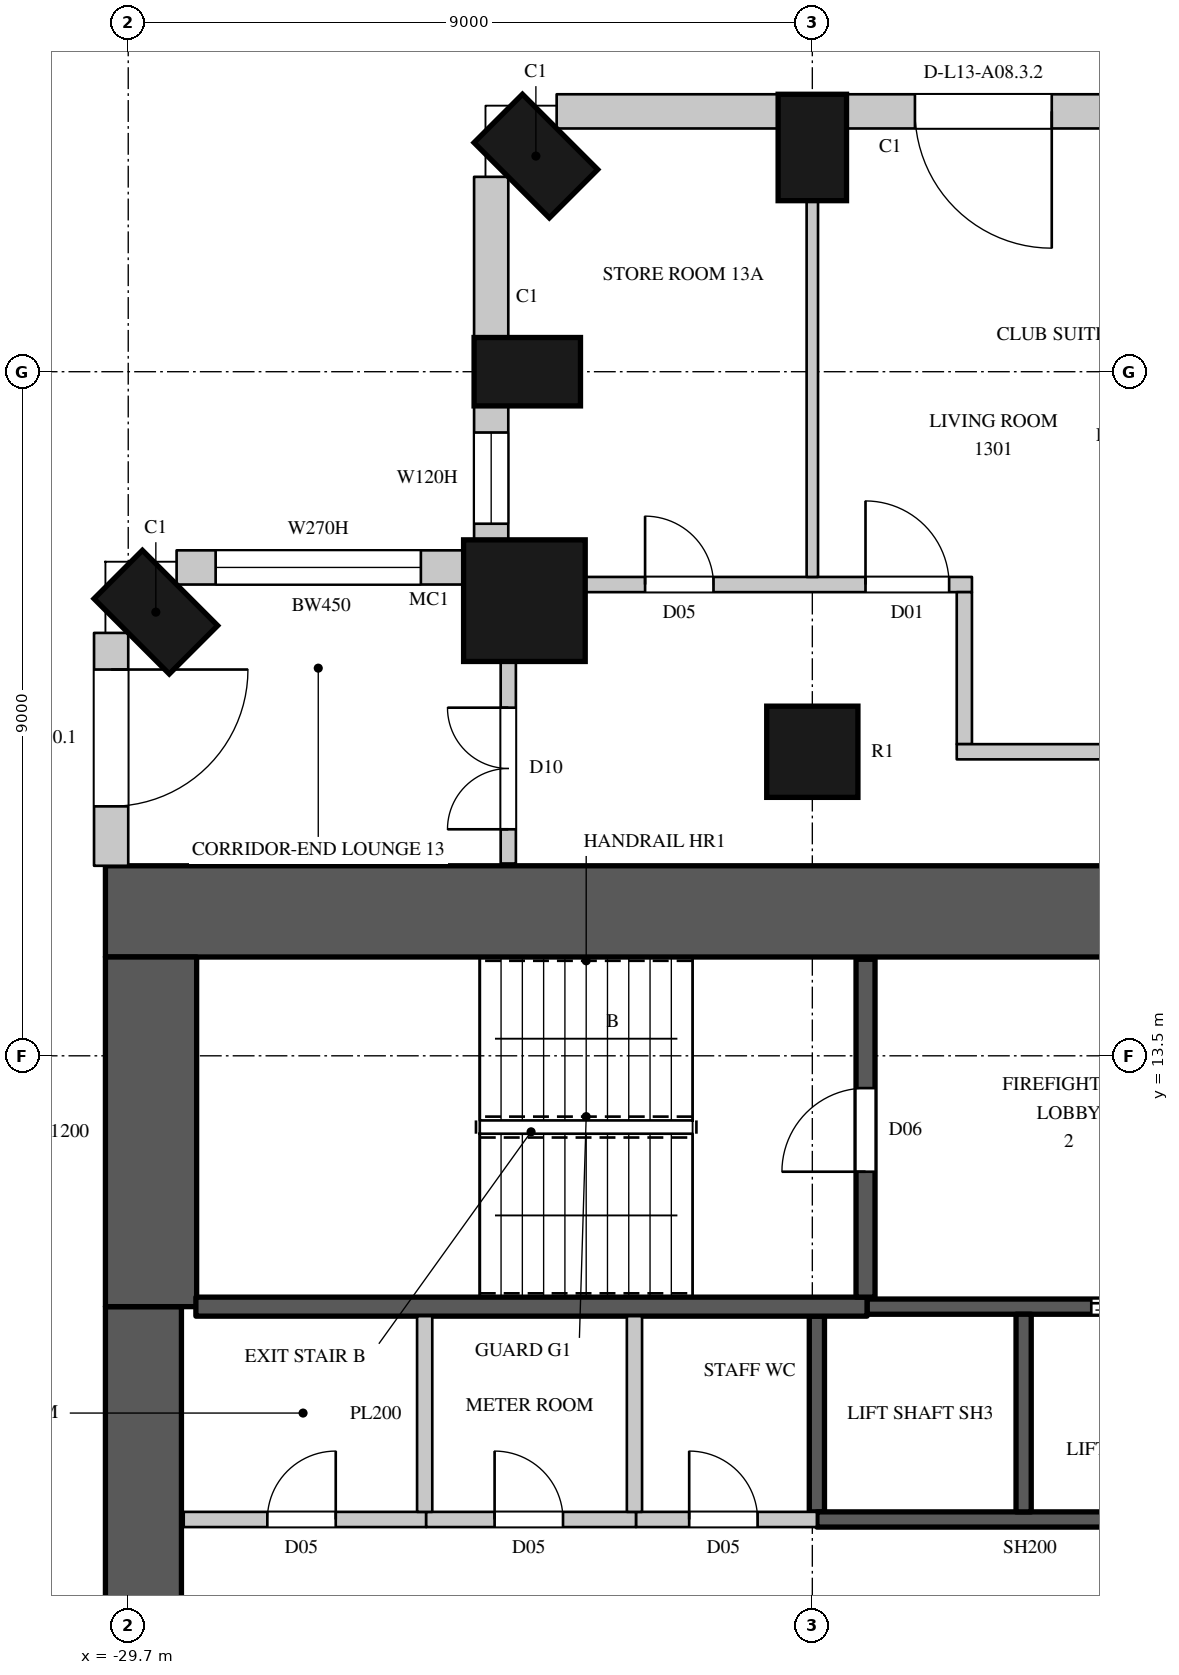
"""IFC4 building model, lengths in metres.
Left out: names, types, materials, properties, quantities, classifications, styles, units other than length and angle.
Written with IfcOpenShell. Run it as: python <this file> out.ifc"""

import sys

from ifc_helpers import new_model, si_unit, direction, frame, frame_2d, origin, origin_2d, place, context, subcontext, project, spatial, rectangle, circle, extrude, element, fill, save


model = new_model("IFC4")
c1 = context("Model", 3, precision=1e-05, world=origin(), true_north=direction((0.0, 1.0)))
c2 = subcontext(c1, "Body", "Model", "MODEL_VIEW")
j1 = project(units=[si_unit("LENGTHUNIT", "METRE"), si_unit("PLANEANGLEUNIT", "RADIAN")], contexts=[c1])
p1 = place(None, origin())
s1 = spatial("IfcSite", under=j1, at=p1, CompositionType="ELEMENT")
p2 = place(p1, origin())
s2 = spatial("IfcBuilding", under=s1, at=p2, CompositionType="ELEMENT")
p3 = place(p2, frame((0.0, 0.0, 77.1)))
s3 = spatial("IfcBuildingStorey", under=s2, at=p3, CompositionType="ELEMENT", Elevation=77.1)
for number, where, z_axis, x_axis in (
    (1, (-29.337, 19.337, 0.0), (0.0, 0.0, 1.0), (-0.707, -0.707, 0.0)),
    (2, (-20.7, 25.45, 0.0), (0.0, 0.0, 1.0), (-1.0, 0.0, 0.0)),
    (3, (-24.337, 25.337, 0.0), (0.0, 0.0, 1.0), (-0.707, -0.707, 0.0)),
    (4, (-24.45, 22.5, 0.0), (0.0, 0.0, 1.0), (0.0, -1.0, 0.0)),
):
    element("IfcColumn", number, at=place(p3, frame(where, z_axis=z_axis, x_axis=x_axis)), inside=s3, PredefinedType="COLUMN", context=c2, shape_type="SweptSolid", body=[
        extrude(rectangle(XDim=0.9, YDim=1.4, at=origin_2d()), origin(), (0.0, 0.0, 1.0), 3.6),
    ])
p4 = place(p3, frame((-24.488, 19.488, 0.0), z_axis=(0.0, 0.0, 1.0), x_axis=(1.0, 0.0, 0.0)))
e5 = element("IfcColumn", 5, at=p4, inside=s3, PredefinedType="COLUMN", context=c2, shape_type="SweptSolid", body=[
    extrude(circle(Radius=0.8, at=origin_2d()), origin(), (0.0, 0.0, 1.0), 3.6),
])
p5 = place(p3, frame((-20.7, 17.5, 0.0), z_axis=(0.0, 0.0, 1.0), x_axis=(1.0, 0.0, 0.0)))
e6 = element("IfcColumn", 6, at=p5, inside=s3, PredefinedType="COLUMN", context=c2, shape_type="SweptSolid", body=[
    extrude(circle(Radius=0.6, at=origin_2d()), origin(), (0.0, 0.0, 1.0), 3.6),
])
p6 = place(p3, frame((-29.925, 19.064, 0.0), z_axis=(0.0, 0.0, 1.0), x_axis=(0.0, -1.0, 0.0)))
e7 = element("IfcWall", 7, at=p6, inside=s3, PredefinedType="SOLIDWALL", context=c2, shape_type="SweptSolid", body=[
    extrude(rectangle(XDim=3.064, YDim=0.45, at=frame_2d((1.532, 0.0))), origin(), (0.0, 0.0, 1.0), 3.3),
])
p7 = place(p6, frame((0.482, 0.0, 0.0)))
e8 = element("IfcOpeningElement", 8, at=p7, cuts=e7, PredefinedType="OPENING", context=c2, shape_type="SweptSolid", body=[
    extrude(rectangle(XDim=1.8, YDim=2.4, at=frame_2d((0.9, 1.2))), frame((0.0, 0.235, 0.0), z_axis=(0.0, -1.0, 0.0), x_axis=(1.0, 0.0, 0.0)), (0.0, 0.0, 1.0), 0.47),
])
p8 = place(p3, frame((-12.15, 25.925, 0.0), z_axis=(0.0, 0.0, 1.0), x_axis=(-1.0, 0.0, 0.0)))
e9 = element("IfcWall", 9, at=p8, inside=s3, PredefinedType="SOLIDWALL", context=c2, shape_type="SweptSolid", body=[
    extrude(rectangle(XDim=8.1, YDim=0.45, at=frame_2d((4.05, 0.0))), origin(), (0.0, 0.0, 1.0), 3.3),
])
p9 = place(p8, frame((0.2, 0.0, 0.0)))
e10 = element("IfcOpeningElement", 10, at=p9, cuts=e9, PredefinedType="OPENING", context=c2, shape_type="SweptSolid", body=[
    extrude(rectangle(XDim=1.8, YDim=2.4, at=frame_2d((0.9, 1.2))), frame((0.0, 0.235, 0.0), z_axis=(0.0, -1.0, 0.0), x_axis=(1.0, 0.0, 0.0)), (0.0, 0.0, 1.0), 0.47),
])
p10 = place(p8, frame((2.2, 0.0, 1.05)))
e11 = element("IfcOpeningElement", 11, at=p10, cuts=e9, PredefinedType="OPENING", context=c2, shape_type="SweptSolid", body=[
    extrude(rectangle(XDim=1.2, YDim=2.0, at=frame_2d((0.6, 1.0))), frame((0.0, 0.235, 0.0), z_axis=(0.0, -1.0, 0.0), x_axis=(1.0, 0.0, 0.0)), (0.0, 0.0, 1.0), 0.47),
])
p11 = place(p8, frame((5.4, 0.0, 0.0)))
e12 = element("IfcOpeningElement", 12, at=p11, cuts=e9, PredefinedType="OPENING", context=c2, shape_type="SweptSolid", body=[
    extrude(rectangle(XDim=1.8, YDim=2.4, at=frame_2d((0.9, 1.2))), frame((0.0, 0.235, 0.0), z_axis=(0.0, -1.0, 0.0), x_axis=(1.0, 0.0, 0.0)), (0.0, 0.0, 1.0), 0.47),
])
p12 = place(p3, frame((-21.15, 25.925, 0.0), z_axis=(0.0, 0.0, 1.0), x_axis=(-1.0, 0.0, 0.0)))
e13 = element("IfcWall", 13, at=p12, inside=s3, PredefinedType="SOLIDWALL", context=c2, shape_type="SweptSolid", body=[
    extrude(rectangle(XDim=2.914, YDim=0.45, at=frame_2d((1.457, 0.0))), origin(), (0.0, 0.0, 1.0), 3.3),
])
p13 = place(p3, frame((-24.925, 25.064, 0.0), z_axis=(0.0, 0.0, 1.0), x_axis=(0.0, -1.0, 0.0)))
e14 = element("IfcWall", 14, at=p13, inside=s3, PredefinedType="SOLIDWALL", context=c2, shape_type="SweptSolid", body=[
    extrude(rectangle(XDim=2.114, YDim=0.45, at=frame_2d((1.057, 0.0))), origin(), (0.0, 0.0, 1.0), 3.3),
])
p14 = place(p3, frame((-24.925, 22.05, 0.0), z_axis=(0.0, 0.0, 1.0), x_axis=(0.0, -1.0, 0.0)))
e15 = element("IfcWall", 15, at=p14, inside=s3, PredefinedType="SOLIDWALL", context=c2, shape_type="SweptSolid", body=[
    extrude(rectangle(XDim=1.792, YDim=0.45, at=frame_2d((0.896, 0.0))), origin(), (0.0, 0.0, 1.0), 3.3),
])
p15 = place(p14, frame((0.35, 0.0, 1.05)))
e16 = element("IfcOpeningElement", 16, at=p15, cuts=e15, PredefinedType="OPENING", context=c2, shape_type="SweptSolid", body=[
    extrude(rectangle(XDim=1.2, YDim=2.0, at=frame_2d((0.6, 1.0))), frame((0.0, 0.235, 0.0), z_axis=(0.0, -1.0, 0.0), x_axis=(1.0, 0.0, 0.0)), (0.0, 0.0, 1.0), 0.47),
])
p16 = place(p3, frame((-25.259, 19.925, 0.0), z_axis=(0.0, 0.0, 1.0), x_axis=(-1.0, 0.0, 0.0)))
e17 = element("IfcWall", 17, at=p16, inside=s3, PredefinedType="SOLIDWALL", context=c2, shape_type="SweptSolid", body=[
    extrude(rectangle(XDim=3.805, YDim=0.45, at=frame_2d((1.903, 0.0))), origin(), (0.0, 0.0, 1.0), 3.3),
])
p17 = place(p16, frame((0.592, 0.0, 1.05)))
e18 = element("IfcOpeningElement", 18, at=p17, cuts=e17, PredefinedType="OPENING", context=c2, shape_type="SweptSolid", body=[
    extrude(rectangle(XDim=2.7, YDim=2.0, at=frame_2d((1.35, 1.0))), frame((0.0, 0.235, 0.0), z_axis=(0.0, -1.0, 0.0), x_axis=(1.0, 0.0, 0.0)), (0.0, 0.0, 1.0), 0.47),
])
p18 = place(p3, frame((-30.0, 15.4, 0.0), z_axis=(0.0, 0.0, 1.0), x_axis=(1.0, 0.0, 0.0)))
e19 = element("IfcWall", 19, at=p18, inside=s3, PredefinedType="SHEAR", context=c2, shape_type="SweptSolid", body=[
    extrude(rectangle(XDim=16.0, YDim=1.2, at=frame_2d((8.0, 0.0))), origin(), (0.0, 0.0, 1.0), 3.6),
])
p19 = place(p18, frame((13.4, 0.0, 0.0)))
e20 = element("IfcOpeningElement", 20, at=p19, cuts=e19, PredefinedType="OPENING", context=c2, shape_type="SweptSolid", body=[
    extrude(rectangle(XDim=1.5, YDim=2.4, at=frame_2d((0.75, 1.2))), frame((0.0, 0.61, 0.0), z_axis=(0.0, -1.0, 0.0), x_axis=(1.0, 0.0, 0.0)), (0.0, 0.0, 1.0), 1.22),
])
p20 = place(p3, frame((-29.5, -10.2, 0.0), z_axis=(0.0, 0.0, 1.0), x_axis=(0.0, 1.0, 0.0)))
e21 = element("IfcWall", 21, at=p20, inside=s3, PredefinedType="SHEAR", context=c2, shape_type="SweptSolid", body=[
    extrude(rectangle(XDim=20.4, YDim=1.0, at=frame_2d((10.2, 0.0))), origin(), (0.0, 0.0, 1.0), 3.6),
])
p21 = place(p3, frame((-29.4, 10.2, 0.0), z_axis=(0.0, 0.0, 1.0), x_axis=(0.0, 1.0, 0.0)))
e22 = element("IfcWall", 22, at=p21, inside=s3, PredefinedType="SHEAR", context=c2, shape_type="SweptSolid", body=[
    extrude(rectangle(XDim=4.6, YDim=1.2, at=frame_2d((2.3, 0.0))), origin(), (0.0, 0.0, 1.0), 3.6),
])
p22 = place(p3, frame((-28.97, 7.4, 0.0), z_axis=(0.0, 0.0, 1.0), x_axis=(1.0, 0.0, 0.0)))
e23 = element("IfcWall", 23, at=p22, inside=s3, PredefinedType="PARTITIONING", context=c2, shape_type="SweptSolid", body=[
    extrude(rectangle(XDim=3.19, YDim=0.2, at=frame_2d((1.595, 0.0))), origin(), (0.0, 0.0, 1.0), 3.3),
])
p23 = place(p22, frame((1.1, 0.0, 0.0)))
e24 = element("IfcOpeningElement", 24, at=p23, cuts=e23, PredefinedType="OPENING", context=c2, shape_type="SweptSolid", body=[
    extrude(rectangle(XDim=0.9, YDim=2.2, at=frame_2d((0.45, 1.1))), frame((0.0, 0.11, 0.0), z_axis=(0.0, -1.0, 0.0), x_axis=(1.0, 0.0, 0.0)), (0.0, 0.0, 1.0), 0.22),
])
p24 = place(p3, frame((-24.7, 16.03, 0.0), z_axis=(0.0, 0.0, 1.0), x_axis=(0.0, 1.0, 0.0)))
e25 = element("IfcWall", 25, at=p24, inside=s3, PredefinedType="PARTITIONING", context=c2, shape_type="SweptSolid", body=[
    extrude(rectangle(XDim=2.67, YDim=0.2, at=frame_2d((1.335, 0.0))), origin(), (0.0, 0.0, 1.0), 3.3),
])
p25 = place(p24, frame((0.45, 0.0, 0.0)))
e26 = element("IfcOpeningElement", 26, at=p25, cuts=e25, PredefinedType="OPENING", context=c2, shape_type="SweptSolid", body=[
    extrude(rectangle(XDim=1.6, YDim=2.4, at=frame_2d((0.8, 1.2))), frame((0.0, 0.11, 0.0), z_axis=(0.0, -1.0, 0.0), x_axis=(1.0, 0.0, 0.0)), (0.0, 0.0, 1.0), 0.22),
])
p26 = place(p3, frame((-23.7, 19.7, 0.0), z_axis=(0.0, 0.0, 1.0), x_axis=(1.0, 0.0, 0.0)))
e27 = element("IfcWall", 27, at=p26, inside=s3, PredefinedType="PARTITIONING", context=c2, shape_type="SweptSolid", body=[
    extrude(rectangle(XDim=5.1, YDim=0.2, at=frame_2d((2.55, 0.0))), origin(), (0.0, 0.0, 1.0), 3.3),
])
p27 = place(p26, frame((0.8, 0.0, 0.0)))
e28 = element("IfcOpeningElement", 28, at=p27, cuts=e27, PredefinedType="OPENING", context=c2, shape_type="SweptSolid", body=[
    extrude(rectangle(XDim=0.9, YDim=2.2, at=frame_2d((0.45, 1.1))), frame((0.0, 0.11, 0.0), z_axis=(0.0, -1.0, 0.0), x_axis=(1.0, 0.0, 0.0)), (0.0, 0.0, 1.0), 0.22),
])
p28 = place(p26, frame((3.7, 0.0, 0.0)))
e29 = element("IfcOpeningElement", 29, at=p28, cuts=e27, PredefinedType="OPENING", context=c2, shape_type="SweptSolid", body=[
    extrude(rectangle(XDim=1.1, YDim=2.4, at=frame_2d((0.55, 1.2))), frame((0.0, 0.11, 0.0), z_axis=(0.0, -1.0, 0.0), x_axis=(1.0, 0.0, 0.0)), (0.0, 0.0, 1.0), 0.22),
])
p29 = place(p3, frame((-23.02, 7.4, 0.0), z_axis=(0.0, 0.0, 1.0), x_axis=(1.0, 0.0, 0.0)))
e30 = element("IfcWall", 30, at=p29, inside=s3, PredefinedType="PARTITIONING", context=c2, shape_type="SweptSolid", body=[
    extrude(rectangle(XDim=2.38, YDim=0.2, at=frame_2d((1.19, 0.0))), origin(), (0.0, 0.0, 1.0), 3.3),
])
p30 = place(p29, frame((0.7, 0.0, 0.0)))
e31 = element("IfcOpeningElement", 31, at=p30, cuts=e30, PredefinedType="OPENING", context=c2, shape_type="SweptSolid", body=[
    extrude(rectangle(XDim=0.9, YDim=2.2, at=frame_2d((0.45, 1.1))), frame((0.0, 0.11, 0.0), z_axis=(0.0, -1.0, 0.0), x_axis=(1.0, 0.0, 0.0)), (0.0, 0.0, 1.0), 0.22),
])
p31 = place(p3, frame((-18.7, 17.6, 0.0), z_axis=(0.0, 0.0, 1.0), x_axis=(0.0, 1.0, 0.0)))
e32 = element("IfcWall", 32, at=p31, inside=s3, PredefinedType="PARTITIONING", context=c2, shape_type="SweptSolid", body=[
    extrude(rectangle(XDim=2.0, YDim=0.2, at=frame_2d((1.0, 0.0))), origin(), (0.0, 0.0, 1.0), 3.3),
])
p32 = place(p3, frame((-18.8, 17.5, 0.0), z_axis=(0.0, 0.0, 1.0), x_axis=(1.0, 0.0, 0.0)))
e33 = element("IfcWall", 33, at=p32, inside=s3, PredefinedType="PARTITIONING", context=c2, shape_type="SweptSolid", body=[
    extrude(rectangle(XDim=6.5, YDim=0.2, at=frame_2d((3.25, 0.0))), origin(), (0.0, 0.0, 1.0), 2.75),
])
p33 = place(p3, frame((-20.7, 19.8, 0.0), z_axis=(0.0, 0.0, 1.0), x_axis=(0.0, 1.0, 0.0)))
e34 = element("IfcWall", 34, at=p33, inside=s3, PredefinedType="PARTITIONING", context=c2, shape_type="SweptSolid", body=[
    extrude(rectangle(XDim=4.95, YDim=0.15, at=frame_2d((2.475, 0.0))), origin(), (0.0, 0.0, 1.0), 2.75),
])
p34 = place(p3, frame((-25.78, 7.4, 0.0), z_axis=(0.0, 0.0, 1.0), x_axis=(1.0, 0.0, 0.0)))
e35 = element("IfcWall", 35, at=p34, inside=s3, PredefinedType="PARTITIONING", context=c2, shape_type="SweptSolid", body=[
    extrude(rectangle(XDim=2.76, YDim=0.2, at=frame_2d((1.38, 0.0))), origin(), (0.0, 0.0, 1.0), 3.3),
])
p35 = place(p34, frame((0.9, 0.0, 0.0)))
e36 = element("IfcOpeningElement", 36, at=p35, cuts=e35, PredefinedType="OPENING", context=c2, shape_type="SweptSolid", body=[
    extrude(rectangle(XDim=0.9, YDim=2.2, at=frame_2d((0.45, 1.1))), frame((0.0, 0.11, 0.0), z_axis=(0.0, -1.0, 0.0), x_axis=(1.0, 0.0, 0.0)), (0.0, 0.0, 1.0), 0.22),
])
for number, where, z_axis, x_axis in (
    (37, (-25.8, 7.5, 0.0), (0.0, 0.0, 1.0), (0.0, 1.0, 0.0)),
    (38, (-23.04, 7.5, 0.0), (0.0, 0.0, 1.0), (0.0, 1.0, 0.0)),
):
    element("IfcWall", number, at=place(p3, frame(where, z_axis=z_axis, x_axis=x_axis)), inside=s3, PredefinedType="PARTITIONING", context=c2, shape_type="SweptSolid", body=[
        extrude(rectangle(XDim=2.575, YDim=0.2, at=frame_2d((1.288, 0.0))), origin(), (0.0, 0.0, 1.0), 3.3),
    ])
p36 = place(p3, frame((-20.64, 7.5, 0.0), z_axis=(0.0, 0.0, 1.0), x_axis=(0.0, 1.0, 0.0)))
e39 = element("IfcWall", 39, at=p36, inside=s3, PredefinedType="SHEAR", context=c2, shape_type="SweptSolid", body=[
    extrude(rectangle(XDim=2.575, YDim=0.2, at=frame_2d((1.288, 0.0))), origin(), (0.0, 0.0, 1.0), 3.3),
])
p37 = place(p3, frame((-20.64, 7.4, 0.0), z_axis=(0.0, 0.0, 1.0), x_axis=(1.0, 0.0, 0.0)))
e40 = element("IfcWall", 40, at=p37, inside=s3, PredefinedType="SHEAR", context=c2, shape_type="SweptSolid", body=[
    extrude(rectangle(XDim=5.61, YDim=0.2, at=frame_2d((2.805, 0.0))), origin(), (0.0, 0.0, 1.0), 3.3),
])
p38 = place(p3, frame((-19.98, 10.2, 0.0), z_axis=(0.0, 0.0, 1.0), x_axis=(1.0, 0.0, 0.0)))
e41 = element("IfcWall", 41, at=p38, inside=s3, PredefinedType="SHEAR", context=c2, shape_type="SweptSolid", body=[
    extrude(rectangle(XDim=4.95, YDim=0.2, at=frame_2d((2.475, 0.0))), origin(), (0.0, 0.0, 1.0), 3.3),
])
p39 = place(p38, frame((2.95, 0.0, 0.0)))
e42 = element("IfcOpeningElement", 42, at=p39, cuts=e41, PredefinedType="OPENING", context=c2, shape_type="SweptSolid", body=[
    extrude(rectangle(XDim=1.1, YDim=2.2, at=frame_2d((0.55, 1.1))), frame((0.0, 0.11, 0.0), z_axis=(0.0, -1.0, 0.0), x_axis=(1.0, 0.0, 0.0)), (0.0, 0.0, 1.0), 0.22),
])
p40 = place(p3, frame((-17.92, 7.5, 0.0), z_axis=(0.0, 0.0, 1.0), x_axis=(0.0, 1.0, 0.0)))
e43 = element("IfcWall", 43, at=p40, inside=s3, PredefinedType="SHEAR", context=c2, shape_type="SweptSolid", body=[
    extrude(rectangle(XDim=2.6, YDim=0.2, at=frame_2d((1.3, 0.0))), origin(), (0.0, 0.0, 1.0), 3.6),
])
p41 = place(p3, frame((-28.81, 10.2, 0.0), z_axis=(0.0, 0.0, 1.0), x_axis=(1.0, 0.0, 0.0)))
e44 = element("IfcWall", 44, at=p41, inside=s3, PredefinedType="SHEAR", context=c2, shape_type="SweptSolid", body=[
    extrude(rectangle(XDim=8.83, YDim=0.25, at=frame_2d((4.415, 0.0))), origin(), (0.0, 0.0, 1.0), 3.3),
])
p42 = place(p3, frame((-20.0, 10.325, 0.0), z_axis=(0.0, 0.0, 1.0), x_axis=(0.0, 1.0, 0.0)))
e45 = element("IfcWall", 45, at=p42, inside=s3, PredefinedType="SHEAR", context=c2, shape_type="SweptSolid", body=[
    extrude(rectangle(XDim=4.445, YDim=0.25, at=frame_2d((2.223, 0.0))), origin(), (0.0, 0.0, 1.0), 3.3),
])
p43 = place(p42, frame((1.65, 0.0, 0.0)))
e46 = element("IfcOpeningElement", 46, at=p43, cuts=e45, PredefinedType="OPENING", context=c2, shape_type="SweptSolid", body=[
    extrude(rectangle(XDim=1.1, YDim=2.2, at=frame_2d((0.55, 1.1))), frame((0.0, 0.135, 0.0), z_axis=(0.0, -1.0, 0.0), x_axis=(1.0, 0.0, 0.0)), (0.0, 0.0, 1.0), 0.27),
])
p44 = place(p7, origin())
e47 = element("IfcDoor", 47, at=p44, inside=s3, OperationType="SLIDING_TO_LEFT", PredefinedType="DOOR", context=c2, shape_type="SweptSolid", body=[
    extrude(rectangle(XDim=1.8, YDim=2.4, at=frame_2d((0.9, 1.2))), frame((0.0, 0.13, 0.0), z_axis=(0.0, -1.0, 0.0), x_axis=(1.0, 0.0, 0.0)), (0.0, 0.0, 1.0), 0.05),
])
fill(e8, e47)
p45 = place(p11, origin())
e48 = element("IfcDoor", 48, at=p45, inside=s3, OperationType="SLIDING_TO_LEFT", PredefinedType="DOOR", context=c2, shape_type="SweptSolid", body=[
    extrude(rectangle(XDim=1.8, YDim=2.4, at=frame_2d((0.9, 1.2))), frame((0.0, 0.13, 0.0), z_axis=(0.0, -1.0, 0.0), x_axis=(1.0, 0.0, 0.0)), (0.0, 0.0, 1.0), 0.05),
])
fill(e12, e48)
p46 = place(p15, origin())
e49 = element("IfcWindow", 49, at=p46, inside=s3, PartitioningType="SINGLE_PANEL", PredefinedType="WINDOW", context=c2, shape_type="SweptSolid", body=[
    extrude(rectangle(XDim=1.2, YDim=2.0, at=frame_2d((0.6, 1.0))), frame((0.0, 0.135, 0.0), z_axis=(0.0, -1.0, 0.0), x_axis=(1.0, 0.0, 0.0)), (0.0, 0.0, 1.0), 0.06),
])
fill(e16, e49)
p47 = place(p17, origin())
e50 = element("IfcWindow", 50, at=p47, inside=s3, PartitioningType="SINGLE_PANEL", PredefinedType="WINDOW", context=c2, shape_type="SweptSolid", body=[
    extrude(rectangle(XDim=2.7, YDim=2.0, at=frame_2d((1.35, 1.0))), frame((0.0, 0.135, 0.0), z_axis=(0.0, -1.0, 0.0), x_axis=(1.0, 0.0, 0.0)), (0.0, 0.0, 1.0), 0.06),
])
fill(e18, e50)
p48 = place(p43, origin())
e51 = element("IfcDoor", 51, at=p48, inside=s3, OperationType="SINGLE_SWING_LEFT", PredefinedType="DOOR", context=c2, shape_type="SweptSolid", body=[
    extrude(rectangle(XDim=1.1, YDim=2.2, at=frame_2d((0.55, 1.1))), frame((0.0, 0.025, 0.0), z_axis=(0.0, -1.0, 0.0), x_axis=(1.0, 0.0, 0.0)), (0.0, 0.0, 1.0), 0.05),
])
fill(e46, e51)
p49 = place(p23, origin())
e52 = element("IfcDoor", 52, at=p49, inside=s3, OperationType="SINGLE_SWING_RIGHT", PredefinedType="DOOR", context=c2, shape_type="SweptSolid", body=[
    extrude(rectangle(XDim=0.9, YDim=2.2, at=frame_2d((0.45, 1.1))), frame((0.0, 0.025, 0.0), z_axis=(0.0, -1.0, 0.0), x_axis=(1.0, 0.0, 0.0)), (0.0, 0.0, 1.0), 0.05),
])
fill(e24, e52)
p50 = place(p35, origin())
e53 = element("IfcDoor", 53, at=p50, inside=s3, OperationType="SINGLE_SWING_LEFT", PredefinedType="DOOR", context=c2, shape_type="SweptSolid", body=[
    extrude(rectangle(XDim=0.9, YDim=2.2, at=frame_2d((0.45, 1.1))), frame((0.0, 0.025, 0.0), z_axis=(0.0, -1.0, 0.0), x_axis=(1.0, 0.0, 0.0)), (0.0, 0.0, 1.0), 0.05),
])
fill(e36, e53)
p51 = place(p30, origin())
e54 = element("IfcDoor", 54, at=p51, inside=s3, OperationType="SINGLE_SWING_LEFT", PredefinedType="DOOR", context=c2, shape_type="SweptSolid", body=[
    extrude(rectangle(XDim=0.9, YDim=2.2, at=frame_2d((0.45, 1.1))), frame((0.0, 0.025, 0.0), z_axis=(0.0, -1.0, 0.0), x_axis=(1.0, 0.0, 0.0)), (0.0, 0.0, 1.0), 0.05),
])
fill(e31, e54)
p52 = place(p39, origin())
e55 = element("IfcDoor", 55, at=p52, inside=s3, OperationType="DOUBLE_DOOR_SLIDING", PredefinedType="DOOR", context=c2, shape_type="SweptSolid", body=[
    extrude(rectangle(XDim=1.1, YDim=2.2, at=frame_2d((0.55, 1.1))), frame((0.0, 0.025, 0.0), z_axis=(0.0, -1.0, 0.0), x_axis=(1.0, 0.0, 0.0)), (0.0, 0.0, 1.0), 0.05),
])
fill(e42, e55)
p53 = place(p27, origin())
e56 = element("IfcDoor", 56, at=p53, inside=s3, OperationType="SINGLE_SWING_LEFT", PredefinedType="DOOR", context=c2, shape_type="SweptSolid", body=[
    extrude(rectangle(XDim=0.9, YDim=2.2, at=frame_2d((0.45, 1.1))), frame((0.0, 0.025, 0.0), z_axis=(0.0, -1.0, 0.0), x_axis=(1.0, 0.0, 0.0)), (0.0, 0.0, 1.0), 0.05),
])
fill(e28, e56)
p54 = place(p25, origin())
e57 = element("IfcDoor", 57, at=p54, inside=s3, OperationType="DOUBLE_DOOR_SINGLE_SWING", PredefinedType="DOOR", context=c2, shape_type="SweptSolid", body=[
    extrude(rectangle(XDim=1.6, YDim=2.4, at=frame_2d((0.8, 1.2))), frame((0.0, 0.025, 0.0), z_axis=(0.0, -1.0, 0.0), x_axis=(1.0, 0.0, 0.0)), (0.0, 0.0, 1.0), 0.05),
])
fill(e26, e57)
p55 = place(p28, origin())
e58 = element("IfcDoor", 58, at=p55, inside=s3, OperationType="SINGLE_SWING_LEFT", PredefinedType="DOOR", context=c2, shape_type="SweptSolid", body=[
    extrude(rectangle(XDim=1.1, YDim=2.4, at=frame_2d((0.55, 1.2))), frame((0.0, 0.025, 0.0), z_axis=(0.0, -1.0, 0.0), x_axis=(1.0, 0.0, 0.0)), (0.0, 0.0, 1.0), 0.05),
])
fill(e29, e58)
save(model, sys.argv[1])
